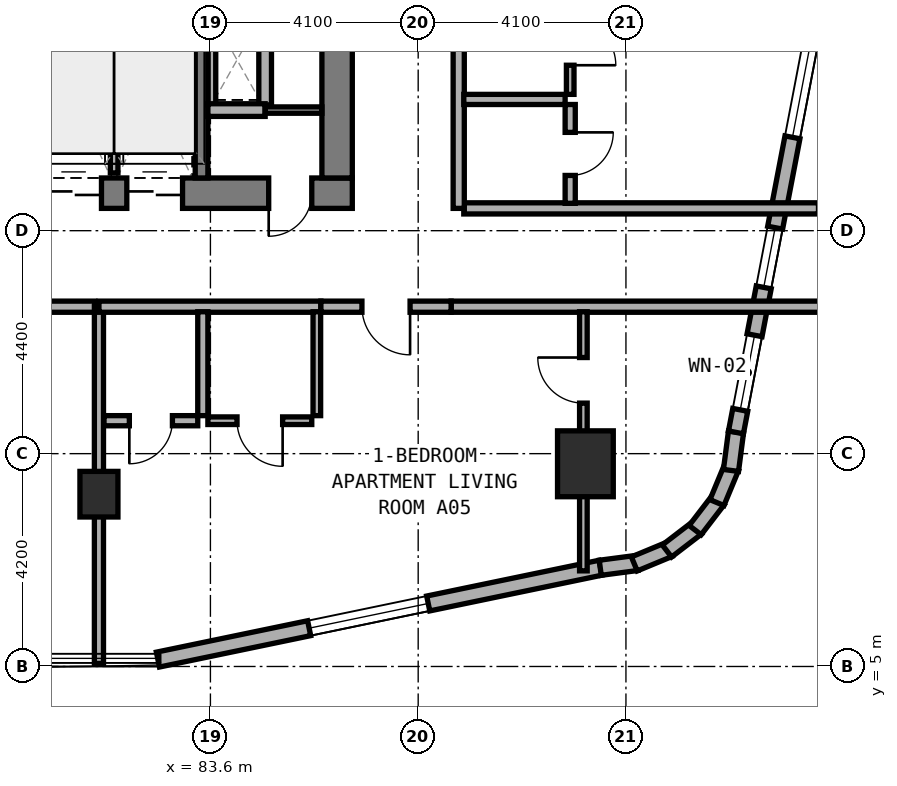
"""IFC4 building model, lengths in metres.
Left out: names, types, materials, properties, quantities, classifications, styles, units other than length and angle.
Written with IfcOpenShell. Run it as: python <this file> out.ifc"""

import sys

from ifc_helpers import new_model, si_unit, direction, frame, frame_2d, origin, origin_2d, place, context, subcontext, project, spatial, rectangle, extrude, element, fill, save


model = new_model("IFC4")
c1 = context("Model", 3, precision=1e-05, world=origin(), true_north=direction((0.0, 1.0)))
c2 = subcontext(c1, "Body", "Model", "MODEL_VIEW")
j1 = project(units=[si_unit("LENGTHUNIT", "METRE"), si_unit("PLANEANGLEUNIT", "RADIAN")], contexts=[c1])
p1 = place(None, origin())
s1 = spatial("IfcSite", under=j1, at=p1, CompositionType="ELEMENT")
p2 = place(p1, origin())
s2 = spatial("IfcBuilding", under=s1, at=p2, CompositionType="ELEMENT")
p3 = place(p2, frame((0.0, 0.0, 38.0)))
s3 = spatial("IfcBuildingStorey", under=s2, at=p3, CompositionType="ELEMENT", Elevation=38.0)
p4 = place(p3, frame((67.8, 14.34, 0.0), z_axis=(0.0, 0.0, 1.0), x_axis=(1.0, 0.0, 0.0)))
e1 = element("IfcWall", 1, at=p4, inside=s3, PredefinedType="SHEAR", context=c2, shape_type="SweptSolid", body=[
    extrude(rectangle(XDim=18.6, YDim=0.6, at=frame_2d((9.3, 0.0))), origin(), (0.0, 0.0, 1.0), 3.5),
])
p5 = place(p4, frame((9.35, 0.0, 0.0)))
e2 = element("IfcOpeningElement", 2, at=p5, cuts=e1, PredefinedType="OPENING", context=c2, shape_type="SweptSolid", body=[
    extrude(rectangle(XDim=1.2, YDim=2.15, at=frame_2d((0.6, 1.075))), frame((0.0, 0.31, 0.0), z_axis=(0.0, -1.0, 0.0), x_axis=(1.0, 0.0, 0.0)), (0.0, 0.0, 1.0), 0.62),
])
p6 = place(p4, frame((16.95, 0.0, 0.0)))
e3 = element("IfcOpeningElement", 3, at=p6, cuts=e1, PredefinedType="OPENING", context=c2, shape_type="SweptSolid", body=[
    extrude(rectangle(XDim=0.85, YDim=2.1, at=frame_2d((0.425, 1.05))), frame((0.0, 0.31, 0.0), z_axis=(0.0, -1.0, 0.0), x_axis=(1.0, 0.0, 0.0)), (0.0, 0.0, 1.0), 0.62),
])
p7 = place(p4, frame((12.55, 0.0, 0.0)))
e4 = element("IfcOpeningElement", 4, at=p7, cuts=e1, PredefinedType="OPENING", context=c2, shape_type="SweptSolid", body=[
    extrude(rectangle(XDim=1.1, YDim=2.15, at=frame_2d((0.55, 1.075))), frame((0.0, 0.31, 0.0), z_axis=(0.0, -1.0, 0.0), x_axis=(1.0, 0.0, 0.0)), (0.0, 0.0, 1.0), 0.62),
])
p8 = place(p4, frame((14.15, 0.0, 0.0)))
e5 = element("IfcOpeningElement", 5, at=p8, cuts=e1, PredefinedType="OPENING", context=c2, shape_type="SweptSolid", body=[
    extrude(rectangle(XDim=1.1, YDim=2.15, at=frame_2d((0.55, 1.075))), frame((0.0, 0.31, 0.0), z_axis=(0.0, -1.0, 0.0), x_axis=(1.0, 0.0, 0.0)), (0.0, 0.0, 1.0), 0.62),
])
p9 = place(p3, frame((86.1, 14.64, 0.0), z_axis=(0.0, 0.0, 1.0), x_axis=(0.0, 1.0, 0.0)))
e6 = element("IfcWall", 6, at=p9, inside=s3, PredefinedType="SHEAR", context=c2, shape_type="SweptSolid", body=[
    extrude(rectangle(XDim=3.16, YDim=0.6, at=frame_2d((1.58, 0.0))), origin(), (0.0, 0.0, 1.0), 3.5),
])
p10 = place(p3, frame((83.425, 14.64, 0.0), z_axis=(0.0, 0.0, 1.0), x_axis=(0.0, 1.0, 0.0)))
e7 = element("IfcWall", 7, at=p10, inside=s3, PredefinedType="STANDARD", context=c2, shape_type="SweptSolid", body=[
    extrude(rectangle(XDim=3.16, YDim=0.25, at=frame_2d((1.58, 0.0))), origin(), (0.0, 0.0, 1.0), 3.25),
])
p11 = place(p3, frame((81.4, 8.4, 0.0), z_axis=(0.0, 0.0, 1.0), x_axis=(1.0, 0.0, 0.0)))
e8 = element("IfcColumn", 8, at=p11, inside=s3, PredefinedType="COLUMN", context=c2, shape_type="SweptSolid", body=[
    extrude(rectangle(XDim=0.75, YDim=0.9, at=origin_2d()), origin(), (0.0, 0.0, 1.0), 3.5),
])
p12 = place(p3, frame((91.0, 9.0, 0.0), z_axis=(0.0, 0.0, 1.0), x_axis=(1.0, 0.0, 0.0)))
e9 = element("IfcColumn", 9, at=p12, inside=s3, PredefinedType="COLUMN", context=c2, shape_type="SweptSolid", body=[
    extrude(rectangle(XDim=1.1, YDim=1.3, at=origin_2d()), origin(), (0.0, 0.0, 1.0), 3.5),
])
p13 = place(p3, frame((82.564, 5.136, 0.0), z_axis=(0.0, 0.0, 1.0), x_axis=(0.979128391325, 0.203242695569, 0.0)))
e10 = element("IfcWall", 10, at=p13, inside=s3, PredefinedType="STANDARD", context=c2, shape_type="SweptSolid", body=[
    extrude(rectangle(XDim=8.92, YDim=0.3, at=frame_2d((4.46, 0.0))), origin(), (0.0, 0.0, 1.0), 3.25),
])
p14 = place(p13, frame((3.048, 0.0, 0.8)))
e11 = element("IfcOpeningElement", 11, at=p14, cuts=e10, PredefinedType="OPENING", context=c2, shape_type="SweptSolid", body=[
    extrude(rectangle(XDim=2.4, YDim=1.6, at=frame_2d((1.2, 0.8))), frame((0.0, 0.16, 0.0), z_axis=(0.0, -1.0, 0.0), x_axis=(1.0, 0.0, 0.0)), (0.0, 0.0, 1.0), 0.32),
])
p15 = place(p3, frame((91.293, 6.948, 0.0), z_axis=(0.0, 0.0, 1.0), x_axis=(0.991486167159, 0.13021205909, 0.0)))
e12 = element("IfcWall", 12, at=p15, inside=s3, PredefinedType="STANDARD", context=c2, shape_type="SweptSolid", body=[
    extrude(rectangle(XDim=0.729, YDim=0.3, at=frame_2d((0.365, 0.0))), origin(), (0.0, 0.0, 1.0), 3.25),
])
for number, where, z_axis, x_axis in (
    (13, (91.965, 7.024, 0.0), (0.0, 0.0, 1.0), (0.924, 0.384, 0.0)),
    (14, (92.609, 7.279, 0.0), (0.0, 0.0, 1.0), (0.794, 0.608, 0.0)),
    (15, (93.166, 7.691, 0.0), (0.0, 0.0, 1.0), (0.609, 0.793, 0.0)),
):
    element("IfcWall", number, at=place(p3, frame(where, z_axis=z_axis, x_axis=x_axis)), inside=s3, PredefinedType="STANDARD", context=c2, shape_type="SweptSolid", body=[
        extrude(rectangle(XDim=0.746, YDim=0.3, at=frame_2d((0.373, 0.0))), origin(), (0.0, 0.0, 1.0), 3.25),
    ])
p16 = place(p3, frame((93.596, 8.234, 0.0), z_axis=(0.0, 0.0, 1.0), x_axis=(0.383430326427, 0.923569805037, 0.0)))
e16 = element("IfcWall", 16, at=p16, inside=s3, PredefinedType="STANDARD", context=c2, shape_type="SweptSolid", body=[
    extrude(rectangle(XDim=0.746, YDim=0.3, at=frame_2d((0.373, 0.0))), origin(), (0.0, 0.0, 1.0), 3.25),
])
p17 = place(p3, frame((93.873, 8.869, 0.0), z_axis=(0.0, 0.0, 1.0), x_axis=(0.129339184068, 0.991600411186, 0.0)))
e17 = element("IfcWall", 17, at=p17, inside=s3, PredefinedType="STANDARD", context=c2, shape_type="SweptSolid", body=[
    extrude(rectangle(XDim=0.764, YDim=0.3, at=frame_2d((0.382, 0.0))), origin(), (0.0, 0.0, 1.0), 3.25),
])
p18 = place(p3, frame((93.971, 9.62, 0.0), z_axis=(0.0, 0.0, 1.0), x_axis=(0.188087874316, 0.982152203854, 0.0)))
e18 = element("IfcWall", 18, at=p18, inside=s3, PredefinedType="STANDARD", context=c2, shape_type="SweptSolid", body=[
    extrude(rectangle(XDim=9.634, YDim=0.3, at=frame_2d((4.817, 0.0))), origin(), (0.0, 0.0, 1.0), 3.25),
])
p19 = place(p18, frame((0.452, 0.0, 0.85)))
e19 = element("IfcOpeningElement", 19, at=p19, cuts=e18, PredefinedType="OPENING", context=c2, shape_type="SweptSolid", body=[
    extrude(rectangle(XDim=1.5, YDim=1.5, at=frame_2d((0.75, 0.75))), frame((0.0, 0.16, 0.0), z_axis=(0.0, -1.0, 0.0), x_axis=(1.0, 0.0, 0.0)), (0.0, 0.0, 1.0), 0.32),
])
p20 = place(p18, frame((2.913, 0.0, 0.85)))
e20 = element("IfcOpeningElement", 20, at=p20, cuts=e18, PredefinedType="OPENING", context=c2, shape_type="SweptSolid", body=[
    extrude(rectangle(XDim=1.2, YDim=1.5, at=frame_2d((0.6, 0.75))), frame((0.0, 0.16, 0.0), z_axis=(0.0, -1.0, 0.0), x_axis=(1.0, 0.0, 0.0)), (0.0, 0.0, 1.0), 0.32),
])
p21 = place(p18, frame((5.928, 0.0, 0.8)))
e21 = element("IfcOpeningElement", 21, at=p21, cuts=e18, PredefinedType="OPENING", context=c2, shape_type="SweptSolid", body=[
    extrude(rectangle(XDim=2.4, YDim=1.6, at=frame_2d((1.2, 0.8))), frame((0.0, 0.16, 0.0), z_axis=(0.0, -1.0, 0.0), x_axis=(1.0, 0.0, 0.0)), (0.0, 0.0, 1.0), 0.32),
])
p22 = place(p3, frame((83.63, 16.08, 0.0), z_axis=(0.0, 0.0, 1.0), x_axis=(0.0, 1.0, 0.0)))
e22 = element("IfcWall", 22, at=p22, inside=s3, PredefinedType="PARTITIONING", context=c2, shape_type="SweptSolid", body=[
    extrude(rectangle(XDim=1.62, YDim=0.15, at=frame_2d((0.81, 0.0))), origin(), (0.0, 0.0, 1.0), 2.725),
])
p23 = place(p3, frame((84.68, 16.08, 0.0), z_axis=(0.0, 0.0, 1.0), x_axis=(0.0, 1.0, 0.0)))
e23 = element("IfcWall", 23, at=p23, inside=s3, PredefinedType="SOLIDWALL", context=c2, shape_type="SweptSolid", body=[
    extrude(rectangle(XDim=1.62, YDim=0.25, at=frame_2d((0.81, 0.0))), origin(), (0.0, 0.0, 1.0), 3.22),
])
p24 = place(p3, frame((83.55, 15.98, 0.0), z_axis=(0.0, 0.0, 1.0), x_axis=(1.0, 0.0, 0.0)))
e24 = element("IfcWall", 24, at=p24, inside=s3, PredefinedType="SOLIDWALL", context=c2, shape_type="SweptSolid", body=[
    extrude(rectangle(XDim=1.13, YDim=0.25, at=frame_2d((0.565, 0.0))), origin(), (0.0, 0.0, 1.0), 3.22),
])
p25 = place(p3, frame((84.68, 15.98, 0.0), z_axis=(0.0, 0.0, 1.0), x_axis=(1.0, 0.0, 0.0)))
e25 = element("IfcWall", 25, at=p25, inside=s3, PredefinedType="PARTITIONING", context=c2, shape_type="SweptSolid", body=[
    extrude(rectangle(XDim=1.12, YDim=0.125, at=frame_2d((0.56, 0.0))), origin(), (0.0, 0.0, 1.0), 3.22),
])
p26 = place(p3, frame((81.7, 14.74, 0.0), z_axis=(0.0, 0.0, 1.0), x_axis=(0.0, 1.0, 0.0)))
e26 = element("IfcWall", 26, at=p26, inside=s3, PredefinedType="PARTITIONING", context=c2, shape_type="SweptSolid", body=[
    extrude(rectangle(XDim=2.96, YDim=0.15, at=frame_2d((1.48, 0.0))), origin(), (0.0, 0.0, 1.0), 3.22),
])
p27 = place(p3, frame((76.98, 12.1, 0.0), z_axis=(0.0, 0.0, 1.0), x_axis=(1.0, 0.0, 0.0)))
e27 = element("IfcWall", 27, at=p27, inside=s3, PredefinedType="SOLIDWALL", context=c2, shape_type="SweptSolid", body=[
    extrude(rectangle(XDim=4.34, YDim=0.22, at=frame_2d((2.17, 0.0))), origin(), (0.0, 0.0, 1.0), 2.725),
])
p28 = place(p27, frame((1.695, 0.0, 0.0)))
e28 = element("IfcOpeningElement", 28, at=p28, cuts=e27, PredefinedType="OPENING", context=c2, shape_type="SweptSolid", body=[
    extrude(rectangle(XDim=0.95, YDim=2.1, at=frame_2d((0.475, 1.05))), frame((0.0, 0.12, 0.0), z_axis=(0.0, -1.0, 0.0), x_axis=(1.0, 0.0, 0.0)), (0.0, 0.0, 1.0), 0.24),
])
p29 = place(p3, frame((81.4, 5.06, 0.0), z_axis=(0.0, 0.0, 1.0), x_axis=(0.0, 1.0, 0.0)))
e29 = element("IfcWall", 29, at=p29, inside=s3, PredefinedType="SOLIDWALL", context=c2, shape_type="SweptSolid", body=[
    extrude(rectangle(XDim=7.04, YDim=0.18, at=frame_2d((3.52, 0.0))), origin(), (0.0, 0.0, 1.0), 2.725),
])
p30 = place(p3, frame((81.4, 12.1, 0.0), z_axis=(0.0, 0.0, 1.0), x_axis=(1.0, 0.0, 0.0)))
e30 = element("IfcWall", 30, at=p30, inside=s3, PredefinedType="SOLIDWALL", context=c2, shape_type="SweptSolid", body=[
    extrude(rectangle(XDim=4.38, YDim=0.22, at=frame_2d((2.19, 0.0))), origin(), (0.0, 0.0, 1.0), 2.725),
])
p31 = place(p3, frame((88.35, 12.1, 0.0), z_axis=(0.0, 0.0, 1.0), x_axis=(1.0, 0.0, 0.0)))
e31 = element("IfcWall", 31, at=p31, inside=s3, PredefinedType="SOLIDWALL", context=c2, shape_type="SweptSolid", body=[
    extrude(rectangle(XDim=7.41, YDim=0.22, at=frame_2d((3.705, 0.0))), origin(), (0.0, 0.0, 1.0), 2.865),
])
p32 = place(p3, frame((85.78, 12.1, 0.0), z_axis=(0.0, 0.0, 1.0), x_axis=(1.0, 0.0, 0.0)))
e32 = element("IfcWall", 32, at=p32, inside=s3, PredefinedType="SOLIDWALL", context=c2, shape_type="SweptSolid", body=[
    extrude(rectangle(XDim=2.57, YDim=0.22, at=frame_2d((1.285, 0.0))), origin(), (0.0, 0.0, 1.0), 3.22),
])
p33 = place(p32, frame((0.81, 0.0, 0.0)))
e33 = element("IfcOpeningElement", 33, at=p33, cuts=e32, PredefinedType="OPENING", context=c2, shape_type="SweptSolid", body=[
    extrude(rectangle(XDim=0.95, YDim=2.1, at=frame_2d((0.475, 1.05))), frame((0.0, 0.12, 0.0), z_axis=(0.0, -1.0, 0.0), x_axis=(1.0, 0.0, 0.0)), (0.0, 0.0, 1.0), 0.24),
])
p34 = place(p3, frame((90.96, 6.887, 0.0), z_axis=(0.0, 0.0, 1.0), x_axis=(0.0, 1.0, 0.0)))
e34 = element("IfcWall", 34, at=p34, inside=s3, PredefinedType="PARTITIONING", context=c2, shape_type="SweptSolid", body=[
    extrude(rectangle(XDim=5.113, YDim=0.15, at=frame_2d((2.557, 0.0))), origin(), (0.0, 0.0, 1.0), 2.865),
])
p35 = place(p34, frame((3.31, 0.0, 0.0)))
e35 = element("IfcOpeningElement", 35, at=p35, cuts=e34, PredefinedType="OPENING", context=c2, shape_type="SweptSolid", body=[
    extrude(rectangle(XDim=0.9, YDim=2.1, at=frame_2d((0.45, 1.05))), frame((0.0, 0.085, 0.0), z_axis=(0.0, -1.0, 0.0), x_axis=(1.0, 0.0, 0.0)), (0.0, 0.0, 1.0), 0.17),
])
p36 = place(p3, frame((83.45, 9.95, 0.0), z_axis=(0.0, 0.0, 1.0), x_axis=(0.0, 1.0, 0.0)))
e36 = element("IfcWall", 36, at=p36, inside=s3, PredefinedType="PLUMBINGWALL", context=c2, shape_type="SweptSolid", body=[
    extrude(rectangle(XDim=2.05, YDim=0.2, at=frame_2d((1.025, 0.0))), origin(), (0.0, 0.0, 1.0), 3.22),
])
p37 = place(p3, frame((85.7, 9.95, 0.0), z_axis=(0.0, 0.0, 1.0), x_axis=(0.0, 1.0, 0.0)))
e37 = element("IfcWall", 37, at=p37, inside=s3, PredefinedType="PARTITIONING", context=c2, shape_type="SweptSolid", body=[
    extrude(rectangle(XDim=2.05, YDim=0.15, at=frame_2d((1.025, 0.0))), origin(), (0.0, 0.0, 1.0), 3.22),
])
p38 = place(p3, frame((81.5, 9.85, 0.0), z_axis=(0.0, 0.0, 1.0), x_axis=(1.0, 0.0, 0.0)))
e38 = element("IfcWall", 38, at=p38, inside=s3, PredefinedType="PLUMBINGWALL", context=c2, shape_type="SweptSolid", body=[
    extrude(rectangle(XDim=1.85, YDim=0.2, at=frame_2d((0.925, 0.0))), origin(), (0.0, 0.0, 1.0), 2.725),
])
p39 = place(p38, frame((0.5, 0.0, 0.0)))
e39 = element("IfcOpeningElement", 39, at=p39, cuts=e38, PredefinedType="OPENING", context=c2, shape_type="SweptSolid", body=[
    extrude(rectangle(XDim=0.85, YDim=2.1, at=frame_2d((0.425, 1.05))), frame((0.0, 0.11, 0.0), z_axis=(0.0, -1.0, 0.0), x_axis=(1.0, 0.0, 0.0)), (0.0, 0.0, 1.0), 0.22),
])
p40 = place(p3, frame((83.55, 9.85, 0.0), z_axis=(0.0, 0.0, 1.0), x_axis=(1.0, 0.0, 0.0)))
e40 = element("IfcWall", 40, at=p40, inside=s3, PredefinedType="PARTITIONING", context=c2, shape_type="SweptSolid", body=[
    extrude(rectangle(XDim=2.05, YDim=0.15, at=frame_2d((1.025, 0.0))), origin(), (0.0, 0.0, 1.0), 3.22),
])
p41 = place(p40, frame((0.575, 0.0, 0.0)))
e41 = element("IfcOpeningElement", 41, at=p41, cuts=e40, PredefinedType="OPENING", context=c2, shape_type="SweptSolid", body=[
    extrude(rectangle(XDim=0.9, YDim=2.1, at=frame_2d((0.45, 1.05))), frame((0.0, 0.085, 0.0), z_axis=(0.0, -1.0, 0.0), x_axis=(1.0, 0.0, 0.0)), (0.0, 0.0, 1.0), 0.17),
])
p42 = place(p3, frame((88.6, 14.04, 0.0), z_axis=(0.0, 0.0, 1.0), x_axis=(1.0, 0.0, 0.0)))
e42 = element("IfcWall", 42, at=p42, inside=s3, PredefinedType="SOLIDWALL", context=c2, shape_type="SweptSolid", body=[
    extrude(rectangle(XDim=7.0, YDim=0.22, at=frame_2d((3.5, 0.0))), origin(), (0.0, 0.0, 1.0), 2.865),
])
p43 = place(p3, frame((88.5, 14.04, 0.0), z_axis=(0.0, 0.0, 1.0), x_axis=(0.0, 1.0, 0.0)))
e43 = element("IfcWall", 43, at=p43, inside=s3, PredefinedType="SOLIDWALL", context=c2, shape_type="SweptSolid", body=[
    extrude(rectangle(XDim=4.4, YDim=0.22, at=frame_2d((2.2, 0.0))), origin(), (0.0, 0.0, 1.0), 3.22),
])
p44 = place(p3, frame((88.6, 16.19, 0.0), z_axis=(0.0, 0.0, 1.0), x_axis=(1.0, 0.0, 0.0)))
e44 = element("IfcWall", 44, at=p44, inside=s3, PredefinedType="PLUMBINGWALL", context=c2, shape_type="SweptSolid", body=[
    extrude(rectangle(XDim=2.0, YDim=0.2, at=frame_2d((1.0, 0.0))), origin(), (0.0, 0.0, 1.0), 3.22),
])
p45 = place(p3, frame((90.7, 14.14, 0.0), z_axis=(0.0, 0.0, 1.0), x_axis=(0.0, 1.0, 0.0)))
e45 = element("IfcWall", 45, at=p45, inside=s3, PredefinedType="PLUMBINGWALL", context=c2, shape_type="SweptSolid", body=[
    extrude(rectangle(XDim=1.95, YDim=0.2, at=frame_2d((0.975, 0.0))), origin(), (0.0, 0.0, 1.0), 3.22),
])
p46 = place(p45, frame((0.55, 0.0, 0.0)))
e46 = element("IfcOpeningElement", 46, at=p46, cuts=e45, PredefinedType="OPENING", context=c2, shape_type="SweptSolid", body=[
    extrude(rectangle(XDim=0.85, YDim=2.1, at=frame_2d((0.425, 1.05))), frame((0.0, 0.11, 0.0), z_axis=(0.0, -1.0, 0.0), x_axis=(1.0, 0.0, 0.0)), (0.0, 0.0, 1.0), 0.22),
])
p47 = place(p3, frame((90.7, 16.29, 0.0), z_axis=(0.0, 0.0, 1.0), x_axis=(0.0, 1.0, 0.0)))
e47 = element("IfcWall", 47, at=p47, inside=s3, PredefinedType="PARTITIONING", context=c2, shape_type="SweptSolid", body=[
    extrude(rectangle(XDim=2.05, YDim=0.15, at=frame_2d((1.025, 0.0))), origin(), (0.0, 0.0, 1.0), 3.22),
])
p48 = place(p47, frame((0.575, 0.0, 0.0)))
e48 = element("IfcOpeningElement", 48, at=p48, cuts=e47, PredefinedType="OPENING", context=c2, shape_type="SweptSolid", body=[
    extrude(rectangle(XDim=0.9, YDim=2.1, at=frame_2d((0.45, 1.05))), frame((0.0, 0.085, 0.0), z_axis=(0.0, -1.0, 0.0), x_axis=(1.0, 0.0, 0.0)), (0.0, 0.0, 1.0), 0.17),
])
p49 = place(p14, origin())
e49 = element("IfcWindow", 49, at=p49, inside=s3, PartitioningType="SINGLE_PANEL", PredefinedType="WINDOW", context=c2, shape_type="SweptSolid", body=[
    extrude(rectangle(XDim=2.4, YDim=1.6, at=frame_2d((1.2, 0.8))), frame((0.0, 0.03, 0.0), z_axis=(0.0, -1.0, 0.0), x_axis=(1.0, 0.0, 0.0)), (0.0, 0.0, 1.0), 0.06),
])
fill(e11, e49)
p50 = place(p19, origin())
e50 = element("IfcWindow", 50, at=p50, inside=s3, PartitioningType="SINGLE_PANEL", PredefinedType="WINDOW", context=c2, shape_type="SweptSolid", body=[
    extrude(rectangle(XDim=1.5, YDim=1.5, at=frame_2d((0.75, 0.75))), frame((0.0, 0.03, 0.0), z_axis=(0.0, -1.0, 0.0), x_axis=(1.0, 0.0, 0.0)), (0.0, 0.0, 1.0), 0.06),
])
fill(e19, e50)
p51 = place(p20, origin())
e51 = element("IfcWindow", 51, at=p51, inside=s3, PartitioningType="SINGLE_PANEL", PredefinedType="WINDOW", context=c2, shape_type="SweptSolid", body=[
    extrude(rectangle(XDim=1.2, YDim=1.5, at=frame_2d((0.6, 0.75))), frame((0.0, 0.03, 0.0), z_axis=(0.0, -1.0, 0.0), x_axis=(1.0, 0.0, 0.0)), (0.0, 0.0, 1.0), 0.06),
])
fill(e20, e51)
p52 = place(p21, origin())
e52 = element("IfcWindow", 52, at=p52, inside=s3, PartitioningType="SINGLE_PANEL", PredefinedType="WINDOW", context=c2, shape_type="SweptSolid", body=[
    extrude(rectangle(XDim=2.4, YDim=1.6, at=frame_2d((1.2, 0.8))), frame((0.0, 0.03, 0.0), z_axis=(0.0, -1.0, 0.0), x_axis=(1.0, 0.0, 0.0)), (0.0, 0.0, 1.0), 0.06),
])
fill(e21, e52)
p53 = place(p6, frame((0.85, 0.0, 0.0), z_axis=(0.0, 0.0, 1.0), x_axis=(-1.0, 0.0, 0.0)))
e53 = element("IfcDoor", 53, at=p53, inside=s3, OperationType="SINGLE_SWING_RIGHT", PredefinedType="DOOR", context=c2, shape_type="SweptSolid", body=[
    extrude(rectangle(XDim=0.85, YDim=2.1, at=frame_2d((0.425, 1.05))), frame((0.0, 0.025, 0.0), z_axis=(0.0, -1.0, 0.0), x_axis=(1.0, 0.0, 0.0)), (0.0, 0.0, 1.0), 0.05),
])
fill(e3, e53)
p54 = place(p7, frame((1.1, 0.0, 0.0), z_axis=(0.0, 0.0, 1.0), x_axis=(-1.0, 0.0, 0.0)))
e54 = element("IfcDoor", 54, at=p54, inside=s3, OperationType="DOUBLE_DOOR_SLIDING", PredefinedType="DOOR", context=c2, shape_type="SweptSolid", body=[
    extrude(rectangle(XDim=1.1, YDim=2.15, at=frame_2d((0.55, 1.075))), frame((0.0, 0.025, 0.0), z_axis=(0.0, -1.0, 0.0), x_axis=(1.0, 0.0, 0.0)), (0.0, 0.0, 1.0), 0.05),
])
fill(e4, e54)
p55 = place(p8, frame((1.1, 0.0, 0.0), z_axis=(0.0, 0.0, 1.0), x_axis=(-1.0, 0.0, 0.0)))
e55 = element("IfcDoor", 55, at=p55, inside=s3, OperationType="DOUBLE_DOOR_SLIDING", PredefinedType="DOOR", context=c2, shape_type="SweptSolid", body=[
    extrude(rectangle(XDim=1.1, YDim=2.15, at=frame_2d((0.55, 1.075))), frame((0.0, 0.025, 0.0), z_axis=(0.0, -1.0, 0.0), x_axis=(1.0, 0.0, 0.0)), (0.0, 0.0, 1.0), 0.05),
])
fill(e5, e55)
p56 = place(p33, frame((0.95, 0.0, 0.0), z_axis=(0.0, 0.0, 1.0), x_axis=(-1.0, 0.0, 0.0)))
e56 = element("IfcDoor", 56, at=p56, inside=s3, OperationType="SINGLE_SWING_LEFT", PredefinedType="DOOR", context=c2, shape_type="SweptSolid", body=[
    extrude(rectangle(XDim=0.95, YDim=2.1, at=frame_2d((0.475, 1.05))), frame((0.0, 0.025, 0.0), z_axis=(0.0, -1.0, 0.0), x_axis=(1.0, 0.0, 0.0)), (0.0, 0.0, 1.0), 0.05),
])
fill(e33, e56)
p57 = place(p35, origin())
e57 = element("IfcDoor", 57, at=p57, inside=s3, OperationType="SINGLE_SWING_RIGHT", PredefinedType="DOOR", context=c2, shape_type="SweptSolid", body=[
    extrude(rectangle(XDim=0.9, YDim=2.1, at=frame_2d((0.45, 1.05))), frame((0.0, 0.025, 0.0), z_axis=(0.0, -1.0, 0.0), x_axis=(1.0, 0.0, 0.0)), (0.0, 0.0, 1.0), 0.05),
])
fill(e35, e57)
p58 = place(p39, frame((0.85, 0.0, 0.0), z_axis=(0.0, 0.0, 1.0), x_axis=(-1.0, 0.0, 0.0)))
e58 = element("IfcDoor", 58, at=p58, inside=s3, OperationType="SINGLE_SWING_RIGHT", PredefinedType="DOOR", context=c2, shape_type="SweptSolid", body=[
    extrude(rectangle(XDim=0.85, YDim=2.1, at=frame_2d((0.425, 1.05))), frame((0.0, 0.025, 0.0), z_axis=(0.0, -1.0, 0.0), x_axis=(1.0, 0.0, 0.0)), (0.0, 0.0, 1.0), 0.05),
])
fill(e39, e58)
p59 = place(p41, frame((0.9, 0.0, 0.0), z_axis=(0.0, 0.0, 1.0), x_axis=(-1.0, 0.0, 0.0)))
e59 = element("IfcDoor", 59, at=p59, inside=s3, OperationType="SINGLE_SWING_LEFT", PredefinedType="DOOR", context=c2, shape_type="SweptSolid", body=[
    extrude(rectangle(XDim=0.9, YDim=2.1, at=frame_2d((0.45, 1.05))), frame((0.0, 0.025, 0.0), z_axis=(0.0, -1.0, 0.0), x_axis=(1.0, 0.0, 0.0)), (0.0, 0.0, 1.0), 0.05),
])
fill(e41, e59)
p60 = place(p46, frame((0.85, 0.0, 0.0), z_axis=(0.0, 0.0, 1.0), x_axis=(-1.0, 0.0, 0.0)))
e60 = element("IfcDoor", 60, at=p60, inside=s3, OperationType="SINGLE_SWING_LEFT", PredefinedType="DOOR", context=c2, shape_type="SweptSolid", body=[
    extrude(rectangle(XDim=0.85, YDim=2.1, at=frame_2d((0.425, 1.05))), frame((0.0, 0.025, 0.0), z_axis=(0.0, -1.0, 0.0), x_axis=(1.0, 0.0, 0.0)), (0.0, 0.0, 1.0), 0.05),
])
fill(e46, e60)
p61 = place(p48, frame((0.9, 0.0, 0.0), z_axis=(0.0, 0.0, 1.0), x_axis=(-1.0, 0.0, 0.0)))
e61 = element("IfcDoor", 61, at=p61, inside=s3, OperationType="SINGLE_SWING_RIGHT", PredefinedType="DOOR", context=c2, shape_type="SweptSolid", body=[
    extrude(rectangle(XDim=0.9, YDim=2.1, at=frame_2d((0.45, 1.05))), frame((0.0, 0.025, 0.0), z_axis=(0.0, -1.0, 0.0), x_axis=(1.0, 0.0, 0.0)), (0.0, 0.0, 1.0), 0.05),
])
fill(e48, e61)
save(model, sys.argv[1])
